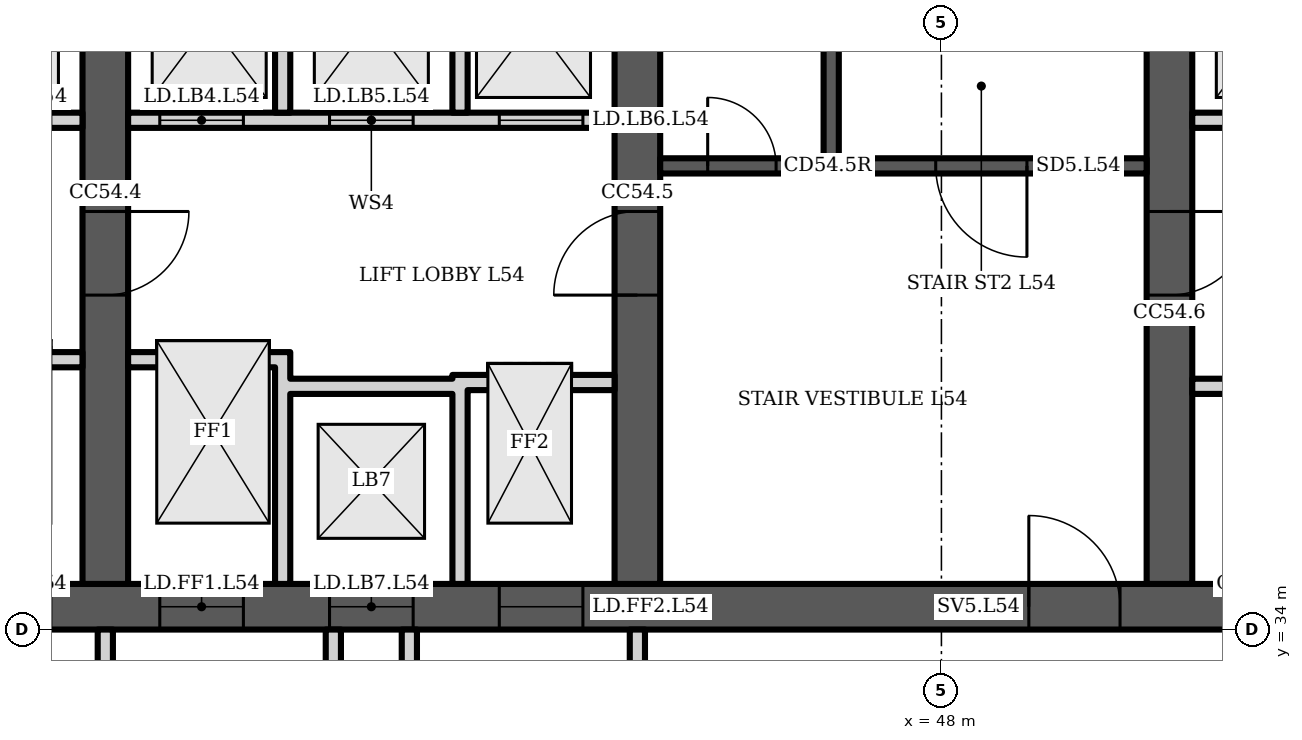
"""IFC4 building model, lengths in metres.
Left out: names, types, materials, properties, quantities, classifications, styles, units other than length and angle.
Written with IfcOpenShell. Run it as: python <this file> out.ifc"""

import sys

from ifc_helpers import new_model, si_unit, direction, frame, frame_2d, origin, place, context, subcontext, project, spatial, polyline, rectangle, outline, extrude, element, fill, save


model = new_model("IFC4")
c1 = context("Model", 3, precision=1e-05, world=origin(), true_north=direction((0.0, 1.0)))
c2 = subcontext(c1, "Body", "Model", "MODEL_VIEW")
j1 = project(units=[si_unit("LENGTHUNIT", "METRE"), si_unit("PLANEANGLEUNIT", "RADIAN")], contexts=[c1])
p1 = place(None, origin())
s1 = spatial("IfcSite", under=j1, at=p1, CompositionType="ELEMENT")
p2 = place(p1, origin())
s2 = spatial("IfcBuilding", under=s1, at=p2, CompositionType="ELEMENT")
p3 = place(p2, frame((0.0, 0.0, 217.9)))
s3 = spatial("IfcBuildingStorey", under=s2, at=p3, CompositionType="ELEMENT", Elevation=217.9)
p4 = place(p3, frame((23.0, 34.3, 0.0), z_axis=(0.0, 0.0, 1.0), x_axis=(1.0, 0.0, 0.0)))
e1 = element("IfcWall", 1, at=p4, inside=s3, PredefinedType="SHEAR", context=c2, shape_type="SweptSolid", body=[
    extrude(rectangle(XDim=35.0, YDim=0.6, at=frame_2d((17.5, 0.0))), origin(), (0.0, 0.0, 1.0), 3.6),
])
p5 = place(p4, frame((0.65, 0.0, 0.0)))
e2 = element("IfcOpeningElement", 2, at=p5, cuts=e1, PredefinedType="OPENING", context=c2, shape_type="SweptSolid", body=[
    extrude(rectangle(XDim=1.2, YDim=2.1, at=frame_2d((0.6, 1.05))), frame((0.0, 0.31, 0.0), z_axis=(0.0, -1.0, 0.0), x_axis=(1.0, 0.0, 0.0)), (0.0, 0.0, 1.0), 0.62),
])
p6 = place(p4, frame((7.717, 0.0, 0.0)))
e3 = element("IfcOpeningElement", 3, at=p6, cuts=e1, PredefinedType="OPENING", context=c2, shape_type="SweptSolid", body=[
    extrude(rectangle(XDim=1.1, YDim=2.1, at=frame_2d((0.55, 1.05))), frame((0.0, 0.31, 0.0), z_axis=(0.0, -1.0, 0.0), x_axis=(1.0, 0.0, 0.0)), (0.0, 0.0, 1.0), 0.62),
])
p7 = place(p4, frame((12.183, 0.0, 0.0)))
e4 = element("IfcOpeningElement", 4, at=p7, cuts=e1, PredefinedType="OPENING", context=c2, shape_type="SweptSolid", body=[
    extrude(rectangle(XDim=1.1, YDim=2.1, at=frame_2d((0.55, 1.05))), frame((0.0, 0.31, 0.0), z_axis=(0.0, -1.0, 0.0), x_axis=(1.0, 0.0, 0.0)), (0.0, 0.0, 1.0), 0.62),
])
p8 = place(p4, frame((9.8, 0.0, 0.0)))
e5 = element("IfcOpeningElement", 5, at=p8, cuts=e1, PredefinedType="OPENING", context=c2, shape_type="SweptSolid", body=[
    extrude(rectangle(XDim=1.4, YDim=2.1, at=frame_2d((0.7, 1.05))), frame((0.0, 0.31, 0.0), z_axis=(0.0, -1.0, 0.0), x_axis=(1.0, 0.0, 0.0)), (0.0, 0.0, 1.0), 0.62),
])
p9 = place(p4, frame((14.717, 0.0, 0.0)))
e6 = element("IfcOpeningElement", 6, at=p9, cuts=e1, PredefinedType="OPENING", context=c2, shape_type="SweptSolid", body=[
    extrude(rectangle(XDim=1.1, YDim=2.1, at=frame_2d((0.55, 1.05))), frame((0.0, 0.31, 0.0), z_axis=(0.0, -1.0, 0.0), x_axis=(1.0, 0.0, 0.0)), (0.0, 0.0, 1.0), 0.62),
])
p10 = place(p4, frame((16.95, 0.0, 0.0)))
e7 = element("IfcOpeningElement", 7, at=p10, cuts=e1, PredefinedType="OPENING", context=c2, shape_type="SweptSolid", body=[
    extrude(rectangle(XDim=1.1, YDim=2.1, at=frame_2d((0.55, 1.05))), frame((0.0, 0.31, 0.0), z_axis=(0.0, -1.0, 0.0), x_axis=(1.0, 0.0, 0.0)), (0.0, 0.0, 1.0), 0.62),
])
p11 = place(p4, frame((19.183, 0.0, 0.0)))
e8 = element("IfcOpeningElement", 8, at=p11, cuts=e1, PredefinedType="OPENING", context=c2, shape_type="SweptSolid", body=[
    extrude(rectangle(XDim=1.1, YDim=2.1, at=frame_2d((0.55, 1.05))), frame((0.0, 0.31, 0.0), z_axis=(0.0, -1.0, 0.0), x_axis=(1.0, 0.0, 0.0)), (0.0, 0.0, 1.0), 0.62),
])
p12 = place(p4, frame((26.15, 0.0, 0.0)))
e9 = element("IfcOpeningElement", 9, at=p12, cuts=e1, PredefinedType="OPENING", context=c2, shape_type="SweptSolid", body=[
    extrude(rectangle(XDim=1.2, YDim=2.1, at=frame_2d((0.6, 1.05))), frame((0.0, 0.31, 0.0), z_axis=(0.0, -1.0, 0.0), x_axis=(1.0, 0.0, 0.0)), (0.0, 0.0, 1.0), 0.62),
])
p13 = place(p4, frame((28.767, 0.0, 0.0)))
e10 = element("IfcOpeningElement", 10, at=p13, cuts=e1, PredefinedType="OPENING", context=c2, shape_type="SweptSolid", body=[
    extrude(rectangle(XDim=1.0, YDim=2.1, at=frame_2d((0.5, 1.05))), frame((0.0, 0.31, 0.0), z_axis=(0.0, -1.0, 0.0), x_axis=(1.0, 0.0, 0.0)), (0.0, 0.0, 1.0), 0.62),
])
p14 = place(p4, frame((33.083, 0.0, 0.0)))
e11 = element("IfcOpeningElement", 11, at=p14, cuts=e1, PredefinedType="OPENING", context=c2, shape_type="SweptSolid", body=[
    extrude(rectangle(XDim=1.0, YDim=2.1, at=frame_2d((0.5, 1.05))), frame((0.0, 0.31, 0.0), z_axis=(0.0, -1.0, 0.0), x_axis=(1.0, 0.0, 0.0)), (0.0, 0.0, 1.0), 0.62),
])
p15 = place(p4, frame((30.8, 0.0, 0.0)))
e12 = element("IfcOpeningElement", 12, at=p15, cuts=e1, PredefinedType="OPENING", context=c2, shape_type="SweptSolid", body=[
    extrude(rectangle(XDim=1.4, YDim=2.1, at=frame_2d((0.7, 1.05))), frame((0.0, 0.31, 0.0), z_axis=(0.0, -1.0, 0.0), x_axis=(1.0, 0.0, 0.0)), (0.0, 0.0, 1.0), 0.62),
])
p16 = place(p3, frame((37.0, 34.6, 0.0), z_axis=(0.0, 0.0, 1.0), x_axis=(0.0, 1.0, 0.0)))
e13 = element("IfcWall", 13, at=p16, inside=s3, PredefinedType="SHEAR", context=c2, shape_type="SweptSolid", body=[
    extrude(rectangle(XDim=14.784, YDim=0.6, at=frame_2d((7.392, 0.0))), origin(), (0.0, 0.0, 1.0), 3.6),
])
p17 = place(p16, frame((11.302, 0.0, 0.0)))
e14 = element("IfcOpeningElement", 14, at=p17, cuts=e13, PredefinedType="OPENING", context=c2, shape_type="SweptSolid", body=[
    extrude(rectangle(XDim=1.0, YDim=2.1, at=frame_2d((0.5, 1.05))), frame((0.0, 0.31, 0.0), z_axis=(0.0, -1.0, 0.0), x_axis=(1.0, 0.0, 0.0)), (0.0, 0.0, 1.0), 0.62),
])
p18 = place(p16, frame((3.8, 0.0, 0.0)))
e15 = element("IfcOpeningElement", 15, at=p18, cuts=e13, PredefinedType="OPENING", context=c2, shape_type="SweptSolid", body=[
    extrude(rectangle(XDim=1.1, YDim=2.1, at=frame_2d((0.55, 1.05))), frame((0.0, 0.31, 0.0), z_axis=(0.0, -1.0, 0.0), x_axis=(1.0, 0.0, 0.0)), (0.0, 0.0, 1.0), 0.62),
])
p19 = place(p3, frame((44.0, 34.6, 0.0), z_axis=(0.0, 0.0, 1.0), x_axis=(0.0, 1.0, 0.0)))
e16 = element("IfcWall", 16, at=p19, inside=s3, PredefinedType="SHEAR", context=c2, shape_type="SweptSolid", body=[
    extrude(rectangle(XDim=14.784, YDim=0.6, at=frame_2d((7.392, 0.0))), origin(), (0.0, 0.0, 1.0), 3.6),
])
p20 = place(p19, frame((11.608, 0.0, 0.0)))
e17 = element("IfcOpeningElement", 17, at=p20, cuts=e16, PredefinedType="OPENING", context=c2, shape_type="SweptSolid", body=[
    extrude(rectangle(XDim=1.0, YDim=2.1, at=frame_2d((0.5, 1.05))), frame((0.0, 0.31, 0.0), z_axis=(0.0, -1.0, 0.0), x_axis=(1.0, 0.0, 0.0)), (0.0, 0.0, 1.0), 0.62),
])
p21 = place(p19, frame((3.8, 0.0, 0.0)))
e18 = element("IfcOpeningElement", 18, at=p21, cuts=e16, PredefinedType="OPENING", context=c2, shape_type="SweptSolid", body=[
    extrude(rectangle(XDim=1.1, YDim=2.1, at=frame_2d((0.55, 1.05))), frame((0.0, 0.31, 0.0), z_axis=(0.0, -1.0, 0.0), x_axis=(1.0, 0.0, 0.0)), (0.0, 0.0, 1.0), 0.62),
])
p22 = place(p3, frame((51.0, 34.6, 0.0), z_axis=(0.0, 0.0, 1.0), x_axis=(0.0, 1.0, 0.0)))
e19 = element("IfcWall", 19, at=p22, inside=s3, PredefinedType="SHEAR", context=c2, shape_type="SweptSolid", body=[
    extrude(rectangle(XDim=14.171, YDim=0.6, at=frame_2d((7.085, 0.0))), origin(), (0.0, 0.0, 1.0), 3.6),
])
p23 = place(p22, frame((3.8, 0.0, 0.0)))
e20 = element("IfcOpeningElement", 20, at=p23, cuts=e19, PredefinedType="OPENING", context=c2, shape_type="SweptSolid", body=[
    extrude(rectangle(XDim=1.1, YDim=2.1, at=frame_2d((0.55, 1.05))), frame((0.0, 0.31, 0.0), z_axis=(0.0, -1.0, 0.0), x_axis=(1.0, 0.0, 0.0)), (0.0, 0.0, 1.0), 0.62),
])
p24 = place(p3, frame((30.3, 40.7, 0.0), z_axis=(0.0, 0.0, 1.0), x_axis=(1.0, 0.0, 0.0)))
e21 = element("IfcWall", 21, at=p24, inside=s3, PredefinedType="PARTITIONING", context=c2, shape_type="SweptSolid", body=[
    extrude(rectangle(XDim=6.4, YDim=0.2, at=frame_2d((3.2, 0.0))), origin(), (0.0, 0.0, 1.0), 3.2),
])
p25 = place(p24, frame((0.417, 0.0, 0.0)))
e22 = element("IfcOpeningElement", 22, at=p25, cuts=e21, PredefinedType="OPENING", context=c2, shape_type="SweptSolid", body=[
    extrude(rectangle(XDim=1.1, YDim=2.1, at=frame_2d((0.55, 1.05))), frame((0.0, 0.11, 0.0), z_axis=(0.0, -1.0, 0.0), x_axis=(1.0, 0.0, 0.0)), (0.0, 0.0, 1.0), 0.22),
])
p26 = place(p24, frame((2.65, 0.0, 0.0)))
e23 = element("IfcOpeningElement", 23, at=p26, cuts=e21, PredefinedType="OPENING", context=c2, shape_type="SweptSolid", body=[
    extrude(rectangle(XDim=1.1, YDim=2.1, at=frame_2d((0.55, 1.05))), frame((0.0, 0.11, 0.0), z_axis=(0.0, -1.0, 0.0), x_axis=(1.0, 0.0, 0.0)), (0.0, 0.0, 1.0), 0.22),
])
p27 = place(p24, frame((4.883, 0.0, 0.0)))
e24 = element("IfcOpeningElement", 24, at=p27, cuts=e21, PredefinedType="OPENING", context=c2, shape_type="SweptSolid", body=[
    extrude(rectangle(XDim=1.1, YDim=2.1, at=frame_2d((0.55, 1.05))), frame((0.0, 0.11, 0.0), z_axis=(0.0, -1.0, 0.0), x_axis=(1.0, 0.0, 0.0)), (0.0, 0.0, 1.0), 0.22),
])
p28 = place(p3, origin())
e25 = element("IfcWall", 25, at=p28, inside=s3, PredefinedType="PARTITIONING", context=c2, shape_type="SweptSolid", body=[
    extrude(outline(polyline([(34.567, 37.65), (34.767, 37.65), (36.7, 37.65), (36.7, 37.45), (34.767, 37.45), (34.767, 34.6), (34.567, 34.6), (34.567, 37.65)])), origin(), (0.0, 0.0, 1.0), 3.2),
])
p29 = place(p3, origin())
e26 = element("IfcWall", 26, at=p29, inside=s3, PredefinedType="PARTITIONING", context=c2, shape_type="SweptSolid", body=[
    extrude(outline(polyline([(32.433, 40.8), (32.233, 40.8), (32.233, 43.8), (30.3, 43.8), (30.3, 44.0), (36.7, 44.0), (36.7, 43.8), (34.767, 43.8), (34.767, 40.8), (34.567, 40.8), (34.567, 43.8), (32.433, 43.8), (32.433, 40.8)])), origin(), (0.0, 0.0, 1.0), 3.2),
])
p30 = place(p3, frame((37.3, 40.7, 0.0), z_axis=(0.0, 0.0, 1.0), x_axis=(1.0, 0.0, 0.0)))
e27 = element("IfcWall", 27, at=p30, inside=s3, PredefinedType="PARTITIONING", context=c2, shape_type="SweptSolid", body=[
    extrude(rectangle(XDim=6.4, YDim=0.2, at=frame_2d((3.2, 0.0))), origin(), (0.0, 0.0, 1.0), 3.2),
])
p31 = place(p30, frame((0.417, 0.0, 0.0)))
e28 = element("IfcOpeningElement", 28, at=p31, cuts=e27, PredefinedType="OPENING", context=c2, shape_type="SweptSolid", body=[
    extrude(rectangle(XDim=1.1, YDim=2.1, at=frame_2d((0.55, 1.05))), frame((0.0, 0.11, 0.0), z_axis=(0.0, -1.0, 0.0), x_axis=(1.0, 0.0, 0.0)), (0.0, 0.0, 1.0), 0.22),
])
p32 = place(p30, frame((2.65, 0.0, 0.0)))
e29 = element("IfcOpeningElement", 29, at=p32, cuts=e27, PredefinedType="OPENING", context=c2, shape_type="SweptSolid", body=[
    extrude(rectangle(XDim=1.1, YDim=2.1, at=frame_2d((0.55, 1.05))), frame((0.0, 0.11, 0.0), z_axis=(0.0, -1.0, 0.0), x_axis=(1.0, 0.0, 0.0)), (0.0, 0.0, 1.0), 0.22),
])
p33 = place(p30, frame((4.883, 0.0, 0.0)))
e30 = element("IfcOpeningElement", 30, at=p33, cuts=e27, PredefinedType="OPENING", context=c2, shape_type="SweptSolid", body=[
    extrude(rectangle(XDim=1.1, YDim=2.1, at=frame_2d((0.55, 1.05))), frame((0.0, 0.11, 0.0), z_axis=(0.0, -1.0, 0.0), x_axis=(1.0, 0.0, 0.0)), (0.0, 0.0, 1.0), 0.22),
])
p34 = place(p3, origin())
e31 = element("IfcWall", 31, at=p34, inside=s3, PredefinedType="PARTITIONING", context=c2, shape_type="SweptSolid", body=[
    extrude(outline(polyline([(41.567, 37.1), (39.433, 37.1), (39.433, 34.6), (39.233, 34.6), (39.233, 37.45), (37.3, 37.45), (37.3, 37.65), (39.233, 37.65), (39.433, 37.65), (39.433, 37.3), (41.567, 37.3), (41.567, 37.35), (41.767, 37.35), (43.7, 37.35), (43.7, 37.15), (41.767, 37.15), (41.767, 34.6), (41.567, 34.6), (41.567, 37.1)])), origin(), (0.0, 0.0, 1.0), 3.2),
])
p35 = place(p3, origin())
e32 = element("IfcWall", 32, at=p35, inside=s3, PredefinedType="PARTITIONING", context=c2, shape_type="SweptSolid", body=[
    extrude(outline(polyline([(39.433, 40.8), (39.233, 40.8), (39.233, 43.8), (37.3, 43.8), (37.3, 44.0), (43.7, 44.0), (43.7, 43.8), (41.767, 43.8), (41.767, 40.8), (41.567, 40.8), (41.567, 43.8), (39.433, 43.8), (39.433, 40.8)])), origin(), (0.0, 0.0, 1.0), 3.2),
])
p36 = place(p3, frame((44.3, 40.1, 0.0), z_axis=(0.0, 0.0, 1.0), x_axis=(1.0, 0.0, 0.0)))
e33 = element("IfcWall", 33, at=p36, inside=s3, PredefinedType="SHEAR", context=c2, shape_type="SweptSolid", body=[
    extrude(rectangle(XDim=6.4, YDim=0.2, at=frame_2d((3.2, 0.0))), origin(), (0.0, 0.0, 1.0), 3.2),
])
p37 = place(p36, frame((3.625, 0.0, 0.0)))
e34 = element("IfcOpeningElement", 34, at=p37, cuts=e33, PredefinedType="OPENING", context=c2, shape_type="SweptSolid", body=[
    extrude(rectangle(XDim=1.2, YDim=2.1, at=frame_2d((0.6, 1.05))), frame((0.0, 0.11, 0.0), z_axis=(0.0, -1.0, 0.0), x_axis=(1.0, 0.0, 0.0)), (0.0, 0.0, 1.0), 0.22),
])
p38 = place(p36, frame((0.625, 0.0, 0.0)))
e35 = element("IfcOpeningElement", 35, at=p38, cuts=e33, PredefinedType="OPENING", context=c2, shape_type="SweptSolid", body=[
    extrude(rectangle(XDim=0.9, YDim=2.1, at=frame_2d((0.45, 1.05))), frame((0.0, 0.11, 0.0), z_axis=(0.0, -1.0, 0.0), x_axis=(1.0, 0.0, 0.0)), (0.0, 0.0, 1.0), 0.22),
])
p39 = place(p3, frame((46.55, 40.2, 0.0), z_axis=(0.0, 0.0, 1.0), x_axis=(0.0, 1.0, 0.0)))
e36 = element("IfcWall", 36, at=p39, inside=s3, PredefinedType="SHEAR", context=c2, shape_type="SweptSolid", body=[
    extrude(rectangle(XDim=7.2, YDim=0.2, at=frame_2d((3.6, 0.0))), origin(), (0.0, 0.0, 1.0), 3.2),
])
p40 = place(p3, frame((51.3, 37.2, 0.0), z_axis=(0.0, 0.0, 1.0), x_axis=(1.0, 0.0, 0.0)))
e37 = element("IfcWall", 37, at=p40, inside=s3, PredefinedType="PARTITIONING", context=c2, shape_type="SweptSolid", body=[
    extrude(rectangle(XDim=1.933, YDim=0.2, at=frame_2d((0.967, 0.0))), origin(), (0.0, 0.0, 1.0), 3.2),
])
p41 = place(p40, frame((0.467, 0.0, 0.0)))
e38 = element("IfcOpeningElement", 38, at=p41, cuts=e37, PredefinedType="OPENING", context=c2, shape_type="SweptSolid", body=[
    extrude(rectangle(XDim=1.0, YDim=2.1, at=frame_2d((0.5, 1.05))), frame((0.0, 0.11, 0.0), z_axis=(0.0, -1.0, 0.0), x_axis=(1.0, 0.0, 0.0)), (0.0, 0.0, 1.0), 0.22),
])
p42 = place(p3, frame((51.3, 40.7, 0.0), z_axis=(0.0, 0.0, 1.0), x_axis=(1.0, 0.0, 0.0)))
e39 = element("IfcWall", 39, at=p42, inside=s3, PredefinedType="PARTITIONING", context=c2, shape_type="SweptSolid", body=[
    extrude(rectangle(XDim=6.1, YDim=0.2, at=frame_2d((3.05, 0.0))), origin(), (0.0, 0.0, 1.0), 3.2),
])
p43 = place(p42, frame((0.417, 0.0, 0.0)))
e40 = element("IfcOpeningElement", 40, at=p43, cuts=e39, PredefinedType="OPENING", context=c2, shape_type="SweptSolid", body=[
    extrude(rectangle(XDim=1.1, YDim=2.1, at=frame_2d((0.55, 1.05))), frame((0.0, 0.11, 0.0), z_axis=(0.0, -1.0, 0.0), x_axis=(1.0, 0.0, 0.0)), (0.0, 0.0, 1.0), 0.22),
])
p44 = place(p42, frame((3.617, 0.0, 0.0)))
e41 = element("IfcOpeningElement", 41, at=p44, cuts=e39, PredefinedType="OPENING", context=c2, shape_type="SweptSolid", body=[
    extrude(rectangle(XDim=1.0, YDim=2.1, at=frame_2d((0.5, 1.05))), frame((0.0, 0.11, 0.0), z_axis=(0.0, -1.0, 0.0), x_axis=(1.0, 0.0, 0.0)), (0.0, 0.0, 1.0), 0.22),
])
p45 = place(p3, frame((37.0, 30.5, 0.0), z_axis=(0.0, 0.0, 1.0), x_axis=(0.0, 1.0, 0.0)))
e42 = element("IfcWall", 42, at=p45, inside=s3, PredefinedType="PARTITIONING", context=c2, shape_type="SweptSolid", body=[
    extrude(rectangle(XDim=3.5, YDim=0.2, at=frame_2d((1.75, 0.0))), origin(), (0.0, 0.0, 1.0), 3.2),
])
p46 = place(p45, frame((1.2, 0.0, 0.0)))
e43 = element("IfcOpeningElement", 43, at=p46, cuts=e42, PredefinedType="OPENING", context=c2, shape_type="SweptSolid", body=[
    extrude(rectangle(XDim=1.1, YDim=2.1, at=frame_2d((0.55, 1.05))), frame((0.0, 0.11, 0.0), z_axis=(0.0, -1.0, 0.0), x_axis=(1.0, 0.0, 0.0)), (0.0, 0.0, 1.0), 0.22),
])
for number, where, z_axis, x_axis in (
    (44, (40.0, 30.5, 0.0), (0.0, 0.0, 1.0), (0.0, 1.0, 0.0)),
    (45, (41.0, 30.5, 0.0), (0.0, 0.0, 1.0), (0.0, 1.0, 0.0)),
):
    element("IfcWall", number, at=place(p3, frame(where, z_axis=z_axis, x_axis=x_axis)), inside=s3, PredefinedType="PARTITIONING", context=c2, shape_type="SweptSolid", body=[
        extrude(rectangle(XDim=3.5, YDim=0.2, at=frame_2d((1.75, 0.0))), origin(), (0.0, 0.0, 1.0), 3.2),
    ])
p47 = place(p3, frame((44.0, 30.5, 0.0), z_axis=(0.0, 0.0, 1.0), x_axis=(0.0, 1.0, 0.0)))
e46 = element("IfcWall", 46, at=p47, inside=s3, PredefinedType="PARTITIONING", context=c2, shape_type="SweptSolid", body=[
    extrude(rectangle(XDim=3.5, YDim=0.2, at=frame_2d((1.75, 0.0))), origin(), (0.0, 0.0, 1.0), 3.2),
])
p48 = place(p47, frame((1.2, 0.0, 0.0)))
e47 = element("IfcOpeningElement", 47, at=p48, cuts=e46, PredefinedType="OPENING", context=c2, shape_type="SweptSolid", body=[
    extrude(rectangle(XDim=1.1, YDim=2.1, at=frame_2d((0.55, 1.05))), frame((0.0, 0.11, 0.0), z_axis=(0.0, -1.0, 0.0), x_axis=(1.0, 0.0, 0.0)), (0.0, 0.0, 1.0), 0.22),
])
p49 = place(p9, origin())
e48 = element("IfcDoor", 48, at=p49, inside=s3, OperationType="DOUBLE_DOOR_SLIDING", PredefinedType="DOOR", context=c2, shape_type="SweptSolid", body=[
    extrude(rectangle(XDim=1.1, YDim=2.1, at=frame_2d((0.55, 1.05))), frame((0.0, 0.025, 0.0), z_axis=(0.0, -1.0, 0.0), x_axis=(1.0, 0.0, 0.0)), (0.0, 0.0, 1.0), 0.05),
])
fill(e6, e48)
p50 = place(p10, origin())
e49 = element("IfcDoor", 49, at=p50, inside=s3, OperationType="DOUBLE_DOOR_SLIDING", PredefinedType="DOOR", context=c2, shape_type="SweptSolid", body=[
    extrude(rectangle(XDim=1.1, YDim=2.1, at=frame_2d((0.55, 1.05))), frame((0.0, 0.025, 0.0), z_axis=(0.0, -1.0, 0.0), x_axis=(1.0, 0.0, 0.0)), (0.0, 0.0, 1.0), 0.05),
])
fill(e7, e49)
p51 = place(p11, origin())
e50 = element("IfcDoor", 50, at=p51, inside=s3, OperationType="DOUBLE_DOOR_SLIDING", PredefinedType="DOOR", context=c2, shape_type="SweptSolid", body=[
    extrude(rectangle(XDim=1.1, YDim=2.1, at=frame_2d((0.55, 1.05))), frame((0.0, 0.025, 0.0), z_axis=(0.0, -1.0, 0.0), x_axis=(1.0, 0.0, 0.0)), (0.0, 0.0, 1.0), 0.05),
])
fill(e8, e50)
p52 = place(p31, origin())
e51 = element("IfcDoor", 51, at=p52, inside=s3, OperationType="DOUBLE_DOOR_SLIDING", PredefinedType="DOOR", context=c2, shape_type="SweptSolid", body=[
    extrude(rectangle(XDim=1.1, YDim=2.1, at=frame_2d((0.55, 1.05))), frame((0.0, 0.025, 0.0), z_axis=(0.0, -1.0, 0.0), x_axis=(1.0, 0.0, 0.0)), (0.0, 0.0, 1.0), 0.05),
])
fill(e28, e51)
p53 = place(p32, origin())
e52 = element("IfcDoor", 52, at=p53, inside=s3, OperationType="DOUBLE_DOOR_SLIDING", PredefinedType="DOOR", context=c2, shape_type="SweptSolid", body=[
    extrude(rectangle(XDim=1.1, YDim=2.1, at=frame_2d((0.55, 1.05))), frame((0.0, 0.025, 0.0), z_axis=(0.0, -1.0, 0.0), x_axis=(1.0, 0.0, 0.0)), (0.0, 0.0, 1.0), 0.05),
])
fill(e29, e52)
p54 = place(p33, origin())
e53 = element("IfcDoor", 53, at=p54, inside=s3, OperationType="DOUBLE_DOOR_SLIDING", PredefinedType="DOOR", context=c2, shape_type="SweptSolid", body=[
    extrude(rectangle(XDim=1.1, YDim=2.1, at=frame_2d((0.55, 1.05))), frame((0.0, 0.025, 0.0), z_axis=(0.0, -1.0, 0.0), x_axis=(1.0, 0.0, 0.0)), (0.0, 0.0, 1.0), 0.05),
])
fill(e30, e53)
p55 = place(p37, origin())
e54 = element("IfcDoor", 54, at=p55, inside=s3, OperationType="SINGLE_SWING_RIGHT", PredefinedType="DOOR", context=c2, shape_type="SweptSolid", body=[
    extrude(rectangle(XDim=1.2, YDim=2.1, at=frame_2d((0.6, 1.05))), frame((0.0, 0.025, 0.0), z_axis=(0.0, -1.0, 0.0), x_axis=(1.0, 0.0, 0.0)), (0.0, 0.0, 1.0), 0.05),
])
fill(e34, e54)
p56 = place(p38, origin())
e55 = element("IfcDoor", 55, at=p56, inside=s3, OperationType="SINGLE_SWING_LEFT", PredefinedType="DOOR", context=c2, shape_type="SweptSolid", body=[
    extrude(rectangle(XDim=0.9, YDim=2.1, at=frame_2d((0.45, 1.05))), frame((0.0, 0.025, 0.0), z_axis=(0.0, -1.0, 0.0), x_axis=(1.0, 0.0, 0.0)), (0.0, 0.0, 1.0), 0.05),
])
fill(e35, e55)
p57 = place(p12, origin())
e56 = element("IfcDoor", 56, at=p57, inside=s3, OperationType="SINGLE_SWING_LEFT", PredefinedType="DOOR", context=c2, shape_type="SweptSolid", body=[
    extrude(rectangle(XDim=1.2, YDim=2.1, at=frame_2d((0.6, 1.05))), frame((0.0, 0.025, 0.0), z_axis=(0.0, -1.0, 0.0), x_axis=(1.0, 0.0, 0.0)), (0.0, 0.0, 1.0), 0.05),
])
fill(e9, e56)
p58 = place(p18, origin())
e57 = element("IfcDoor", 57, at=p58, inside=s3, OperationType="SINGLE_SWING_RIGHT", PredefinedType="DOOR", context=c2, shape_type="SweptSolid", body=[
    extrude(rectangle(XDim=1.1, YDim=2.1, at=frame_2d((0.55, 1.05))), frame((0.0, 0.025, 0.0), z_axis=(0.0, -1.0, 0.0), x_axis=(1.0, 0.0, 0.0)), (0.0, 0.0, 1.0), 0.05),
])
fill(e15, e57)
p59 = place(p21, origin())
e58 = element("IfcDoor", 58, at=p59, inside=s3, OperationType="SINGLE_SWING_LEFT", PredefinedType="DOOR", context=c2, shape_type="SweptSolid", body=[
    extrude(rectangle(XDim=1.1, YDim=2.1, at=frame_2d((0.55, 1.05))), frame((0.0, 0.025, 0.0), z_axis=(0.0, -1.0, 0.0), x_axis=(1.0, 0.0, 0.0)), (0.0, 0.0, 1.0), 0.05),
])
fill(e18, e58)
p60 = place(p23, origin())
e59 = element("IfcDoor", 59, at=p60, inside=s3, OperationType="SINGLE_SWING_RIGHT", PredefinedType="DOOR", context=c2, shape_type="SweptSolid", body=[
    extrude(rectangle(XDim=1.1, YDim=2.1, at=frame_2d((0.55, 1.05))), frame((0.0, 0.025, 0.0), z_axis=(0.0, -1.0, 0.0), x_axis=(1.0, 0.0, 0.0)), (0.0, 0.0, 1.0), 0.05),
])
fill(e20, e59)
save(model, sys.argv[1])
